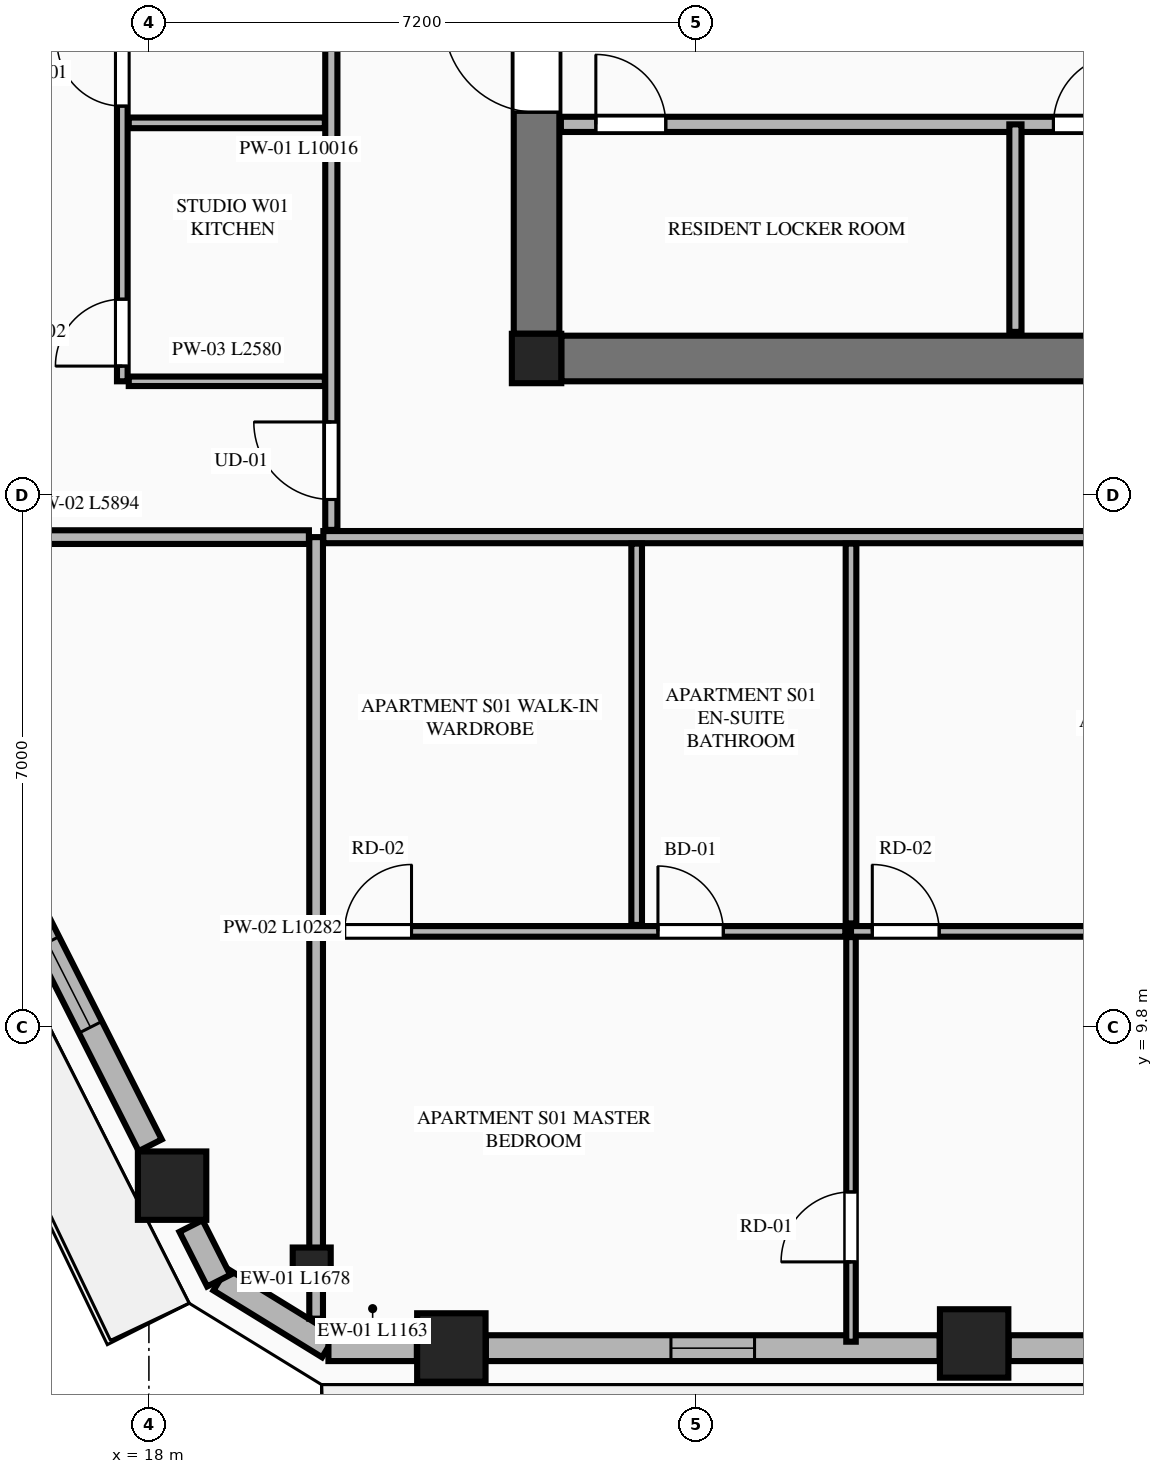
"""IFC4 building model, lengths in metres.
Left out: names, types, materials, properties, quantities, classifications, styles, units other than length and angle.
Written with IfcOpenShell. Run it as: python <this file> out.ifc"""

import sys

from ifc_helpers import new_model, si_unit, direction, frame, frame_2d, origin, origin_2d, place, context, subcontext, project, spatial, rectangle, extrude, element, fill, save


model = new_model("IFC4")
c1 = context("Model", 3, precision=1e-05, world=origin(), true_north=direction((0.0, 1.0)))
c2 = subcontext(c1, "Body", "Model", "MODEL_VIEW")
j1 = project(units=[si_unit("LENGTHUNIT", "METRE"), si_unit("PLANEANGLEUNIT", "RADIAN")], contexts=[c1])
p1 = place(None, origin())
s1 = spatial("IfcSite", under=j1, at=p1, CompositionType="ELEMENT")
p2 = place(p1, origin())
s2 = spatial("IfcBuilding", under=s1, at=p2, CompositionType="ELEMENT")
p3 = place(p2, frame((0.0, 0.0, 196.75)))
s3 = spatial("IfcBuildingStorey", under=s2, at=p3, CompositionType="ELEMENT", Elevation=196.75)
p4 = place(p3, frame((23.1, 18.6, 0.0), z_axis=(0.0, 0.0, 1.0), x_axis=(1.0, 0.0, 0.0)))
e1 = element("IfcColumn", 1, at=p4, inside=s3, PredefinedType="COLUMN", context=c2, shape_type="SweptSolid", body=[
    extrude(rectangle(XDim=0.65, YDim=0.65, at=origin_2d()), origin(), (0.0, 0.0, 1.0), 3.55),
])
p5 = place(p3, frame((23.425, 18.6, 0.0), z_axis=(0.0, 0.0, 1.0), x_axis=(1.0, 0.0, 0.0)))
e2 = element("IfcWall", 2, at=p5, inside=s3, PredefinedType="SHEAR", context=c2, shape_type="SweptSolid", body=[
    extrude(rectangle(XDim=17.95, YDim=0.6, at=frame_2d((8.975, 0.0))), origin(), (0.0, 0.0, 1.0), 3.35),
])
p6 = place(p3, frame((23.1, 18.925, 0.0), z_axis=(0.0, 0.0, 1.0), x_axis=(0.0, 1.0, 0.0)))
e3 = element("IfcWall", 3, at=p6, inside=s3, PredefinedType="SHEAR", context=c2, shape_type="SweptSolid", body=[
    extrude(rectangle(XDim=13.95, YDim=0.6, at=frame_2d((6.975, 0.0))), origin(), (0.0, 0.0, 1.0), 3.35),
])
p7 = place(p6, frame((2.915, 0.0, 0.0)))
e4 = element("IfcOpeningElement", 4, at=p7, cuts=e3, PredefinedType="OPENING", context=c2, shape_type="SweptSolid", body=[
    extrude(rectangle(XDim=1.22, YDim=2.25, at=frame_2d((0.61, 1.125))), frame((0.0, 0.31, 0.0), z_axis=(0.0, -1.0, 0.0), x_axis=(1.0, 0.0, 0.0)), (0.0, 0.0, 1.0), 0.62),
])
for number, where, z_axis, x_axis in (
    (5, (21.979, 5.589, 0.0), (0.0, 0.0, 1.0), (1.0, 0.0, 0.0)),
    (6, (28.857, 5.642, 0.0), (0.0, 0.0, 1.0), (1.0, 0.0, 0.0)),
    (7, (18.305, 7.718, 0.0), (0.0, 0.0, 1.0), (1.0, 0.0, 0.0)),
):
    element("IfcColumn", number, at=place(p3, frame(where, z_axis=z_axis, x_axis=x_axis)), inside=s3, PredefinedType="COLUMN", context=c2, shape_type="SweptSolid", body=[
        extrude(rectangle(XDim=0.9, YDim=0.9, at=origin_2d()), origin(), (0.0, 0.0, 1.0), 3.55),
    ])
p8 = place(p3, frame((20.142, 6.654, 0.0), z_axis=(0.0, 0.0, 1.0), x_axis=(0.865230187018, -0.501374833306, 0.0)))
e8 = element("IfcColumn", 8, at=p8, inside=s3, PredefinedType="PILASTER", context=c2, shape_type="SweptSolid", body=[
    extrude(rectangle(XDim=0.5, YDim=0.35, at=origin_2d()), origin(), (0.0, 0.0, 1.0), 3.55),
])
p9 = place(p3, frame((23.42, 21.68, 0.0), z_axis=(0.0, 0.0, 1.0), x_axis=(1.0, 0.0, 0.0)))
e9 = element("IfcWall", 9, at=p9, inside=s3, PredefinedType="PLUMBINGWALL", context=c2, shape_type="SweptSolid", body=[
    extrude(rectangle(XDim=17.96, YDim=0.2, at=frame_2d((8.98, 0.0))), origin(), (0.0, 0.0, 1.0), 3.35),
])
p10 = place(p9, frame((0.46, 0.0, 0.0)))
e10 = element("IfcOpeningElement", 10, at=p10, cuts=e9, PredefinedType="OPENING", context=c2, shape_type="SweptSolid", body=[
    extrude(rectangle(XDim=0.92, YDim=2.15, at=frame_2d((0.46, 1.075))), frame((0.0, 0.11, 0.0), z_axis=(0.0, -1.0, 0.0), x_axis=(1.0, 0.0, 0.0)), (0.0, 0.0, 1.0), 0.22),
])
p11 = place(p9, frame((6.48, 0.0, 0.0)))
e11 = element("IfcOpeningElement", 11, at=p11, cuts=e9, PredefinedType="OPENING", context=c2, shape_type="SweptSolid", body=[
    extrude(rectangle(XDim=0.92, YDim=2.15, at=frame_2d((0.46, 1.075))), frame((0.0, 0.11, 0.0), z_axis=(0.0, -1.0, 0.0), x_axis=(1.0, 0.0, 0.0)), (0.0, 0.0, 1.0), 0.22),
])
p12 = place(p9, frame((12.48, 0.0, 0.0)))
e12 = element("IfcOpeningElement", 12, at=p12, cuts=e9, PredefinedType="OPENING", context=c2, shape_type="SweptSolid", body=[
    extrude(rectangle(XDim=0.92, YDim=2.15, at=frame_2d((0.46, 1.075))), frame((0.0, 0.11, 0.0), z_axis=(0.0, -1.0, 0.0), x_axis=(1.0, 0.0, 0.0)), (0.0, 0.0, 1.0), 0.22),
])
p13 = place(p3, frame((29.4, 18.95, 0.0), z_axis=(0.0, 0.0, 1.0), x_axis=(0.0, 1.0, 0.0)))
e13 = element("IfcWall", 13, at=p13, inside=s3, PredefinedType="PARTITIONING", context=c2, shape_type="SweptSolid", body=[
    extrude(rectangle(XDim=2.73, YDim=0.16, at=frame_2d((1.365, 0.0))), origin(), (0.0, 0.0, 1.0), 3.35),
])
p14 = place(p3, frame((18.938, 6.484, 0.0), z_axis=(0.0, 0.0, 1.0), x_axis=(0.851778214877, -0.523902541185, 0.0)))
e14 = element("IfcWall", 14, at=p14, inside=s3, PredefinedType="STANDARD", context=c2, shape_type="SweptSolid", body=[
    extrude(rectangle(XDim=1.678, YDim=0.34, at=frame_2d((0.839, 0.0))), origin(), (0.0, 0.0, 1.0), 3.35),
])
p15 = place(p3, frame((20.362, 5.58, 0.0), z_axis=(0.0, 0.0, 1.0), x_axis=(1.0, 0.0, 0.0)))
e15 = element("IfcWall", 15, at=p15, inside=s3, PredefinedType="STANDARD", context=c2, shape_type="SweptSolid", body=[
    extrude(rectangle(XDim=1.163, YDim=0.34, at=frame_2d((0.582, 0.0))), origin(), (0.0, 0.0, 1.0), 3.35),
])
p16 = place(p3, frame((22.433, 5.58, 0.0), z_axis=(0.0, 0.0, 1.0), x_axis=(1.0, 0.0, 0.0)))
e16 = element("IfcWall", 16, at=p16, inside=s3, PredefinedType="STANDARD", context=c2, shape_type="SweptSolid", body=[
    extrude(rectangle(XDim=5.97, YDim=0.34, at=frame_2d((2.985, 0.0))), origin(), (0.0, 0.0, 1.0), 2.883),
])
p17 = place(p16, frame((2.435, 0.0, 0.75)))
e17 = element("IfcOpeningElement", 17, at=p17, cuts=e16, PredefinedType="OPENING", context=c2, shape_type="SweptSolid", body=[
    extrude(rectangle(XDim=1.1, YDim=1.983, at=frame_2d((0.55, 0.991))), frame((0.0, 0.18, 0.0), z_axis=(0.0, -1.0, 0.0), x_axis=(1.0, 0.0, 0.0)), (0.0, 0.0, 1.0), 0.36),
])
p18 = place(p3, frame((29.311, 5.58, 0.0), z_axis=(0.0, 0.0, 1.0), x_axis=(1.0, 0.0, 0.0)))
e18 = element("IfcWall", 18, at=p18, inside=s3, PredefinedType="STANDARD", context=c2, shape_type="SweptSolid", body=[
    extrude(rectangle(XDim=6.178, YDim=0.34, at=frame_2d((3.089, 0.0))), origin(), (0.0, 0.0, 1.0), 2.883),
])
p19 = place(p18, frame((2.539, 0.0, 0.0)))
e19 = element("IfcOpeningElement", 19, at=p19, cuts=e18, PredefinedType="OPENING", context=c2, shape_type="SweptSolid", body=[
    extrude(rectangle(XDim=1.1, YDim=2.25, at=frame_2d((0.55, 1.125))), frame((0.0, 0.18, 0.0), z_axis=(0.0, -1.0, 0.0), x_axis=(1.0, 0.0, 0.0)), (0.0, 0.0, 1.0), 0.36),
])
p20 = place(p3, frame((15.881, 12.47, 0.0), z_axis=(0.0, 0.0, 1.0), x_axis=(0.451522864045, -0.892259549259, 0.0)))
e20 = element("IfcWall", 20, at=p20, inside=s3, PredefinedType="STANDARD", context=c2, shape_type="SweptSolid", body=[
    extrude(rectangle(XDim=4.731, YDim=0.34, at=frame_2d((2.365, 0.0))), origin(), (0.0, 0.0, 1.0), 2.883),
])
p21 = place(p20, frame((1.74, 0.0, 0.75)))
e21 = element("IfcOpeningElement", 21, at=p21, cuts=e20, PredefinedType="OPENING", context=c2, shape_type="SweptSolid", body=[
    extrude(rectangle(XDim=1.25, YDim=1.95, at=frame_2d((0.625, 0.975))), frame((0.0, 0.18, 0.0), z_axis=(0.0, -1.0, 0.0), x_axis=(1.0, 0.0, 0.0)), (0.0, 0.0, 1.0), 0.36),
])
p22 = place(p3, frame((18.554, 7.187, 0.0), z_axis=(0.0, 0.0, 1.0), x_axis=(0.451691568309, -0.892174157392, 0.0)))
e22 = element("IfcWall", 22, at=p22, inside=s3, PredefinedType="STANDARD", context=c2, shape_type="SweptSolid", body=[
    extrude(rectangle(XDim=0.806, YDim=0.34, at=frame_2d((0.403, 0.0))), origin(), (0.0, 0.0, 1.0), 3.35),
])
p23 = place(p3, frame((20.2, 5.968, 0.0), z_axis=(0.0, 0.0, 1.0), x_axis=(0.0, 1.0, 0.0)))
e23 = element("IfcWall", 23, at=p23, inside=s3, PredefinedType="PARTITIONING", context=c2, shape_type="SweptSolid", body=[
    extrude(rectangle(XDim=10.282, YDim=0.18, at=frame_2d((5.141, 0.0))), origin(), (0.0, 0.0, 1.0), 3.35),
])
p24 = place(p3, frame((20.295, 16.25, 0.0), z_axis=(0.0, 0.0, 1.0), x_axis=(1.0, 0.0, 0.0)))
e24 = element("IfcWall", 24, at=p24, inside=s3, PredefinedType="PARTITIONING", context=c2, shape_type="SweptSolid", body=[
    extrude(rectangle(XDim=24.21, YDim=0.16, at=frame_2d((12.105, 0.0))), origin(), (0.0, 0.0, 1.0), 3.35),
])
p25 = place(p24, frame((22.005, 0.0, 0.0)))
e25 = element("IfcOpeningElement", 25, at=p25, cuts=e24, PredefinedType="OPENING", context=c2, shape_type="SweptSolid", body=[
    extrude(rectangle(XDim=1.02, YDim=2.25, at=frame_2d((0.51, 1.125))), frame((0.0, 0.09, 0.0), z_axis=(0.0, -1.0, 0.0), x_axis=(1.0, 0.0, 0.0)), (0.0, 0.0, 1.0), 0.18),
])
p26 = place(p3, frame((27.237, 11.063, 0.0), z_axis=(0.0, 0.0, 1.0), x_axis=(1.0, 0.0, 0.0)))
e26 = element("IfcWall", 26, at=p26, inside=s3, PredefinedType="PLUMBINGWALL", context=c2, shape_type="SweptSolid", body=[
    extrude(rectangle(XDim=14.813, YDim=0.14, at=frame_2d((7.406, 0.0))), origin(), (0.0, 0.0, 1.0), 3.35),
])
p27 = place(p26, frame((0.28, 0.0, 0.0)))
e27 = element("IfcOpeningElement", 27, at=p27, cuts=e26, PredefinedType="OPENING", context=c2, shape_type="SweptSolid", body=[
    extrude(rectangle(XDim=0.88, YDim=2.15, at=frame_2d((0.44, 1.075))), frame((0.0, 0.08, 0.0), z_axis=(0.0, -1.0, 0.0), x_axis=(1.0, 0.0, 0.0)), (0.0, 0.0, 1.0), 0.16),
])
p28 = place(p26, frame((8.948, 0.0, 0.0)))
e28 = element("IfcOpeningElement", 28, at=p28, cuts=e26, PredefinedType="OPENING", context=c2, shape_type="SweptSolid", body=[
    extrude(rectangle(XDim=0.86, YDim=2.1, at=frame_2d((0.43, 1.05))), frame((0.0, 0.08, 0.0), z_axis=(0.0, -1.0, 0.0), x_axis=(1.0, 0.0, 0.0)), (0.0, 0.0, 1.0), 0.16),
])
p29 = place(p26, frame((11.613, 0.0, 0.0)))
e29 = element("IfcOpeningElement", 29, at=p29, cuts=e26, PredefinedType="OPENING", context=c2, shape_type="SweptSolid", body=[
    extrude(rectangle(XDim=0.88, YDim=2.15, at=frame_2d((0.44, 1.075))), frame((0.0, 0.08, 0.0), z_axis=(0.0, -1.0, 0.0), x_axis=(1.0, 0.0, 0.0)), (0.0, 0.0, 1.0), 0.16),
])
p30 = place(p3, frame((20.295, 11.063, 0.0), z_axis=(0.0, 0.0, 1.0), x_axis=(1.0, 0.0, 0.0)))
e30 = element("IfcWall", 30, at=p30, inside=s3, PredefinedType="PLUMBINGWALL", context=c2, shape_type="SweptSolid", body=[
    extrude(rectangle(XDim=6.867, YDim=0.14, at=frame_2d((3.434, 0.0))), origin(), (0.0, 0.0, 1.0), 3.35),
])
p31 = place(p30, frame((0.28, 0.0, 0.0)))
e31 = element("IfcOpeningElement", 31, at=p31, cuts=e30, PredefinedType="OPENING", context=c2, shape_type="SweptSolid", body=[
    extrude(rectangle(XDim=0.88, YDim=2.15, at=frame_2d((0.44, 1.075))), frame((0.0, 0.08, 0.0), z_axis=(0.0, -1.0, 0.0), x_axis=(1.0, 0.0, 0.0)), (0.0, 0.0, 1.0), 0.16),
])
p32 = place(p30, frame((4.402, 0.0, 0.0)))
e32 = element("IfcOpeningElement", 32, at=p32, cuts=e30, PredefinedType="OPENING", context=c2, shape_type="SweptSolid", body=[
    extrude(rectangle(XDim=0.86, YDim=2.1, at=frame_2d((0.43, 1.05))), frame((0.0, 0.08, 0.0), z_axis=(0.0, -1.0, 0.0), x_axis=(1.0, 0.0, 0.0)), (0.0, 0.0, 1.0), 0.16),
])
p33 = place(p3, frame((27.237, 11.168, 0.0), z_axis=(0.0, 0.0, 1.0), x_axis=(0.0, 1.0, 0.0)))
e33 = element("IfcWall", 33, at=p33, inside=s3, PredefinedType="PLUMBINGWALL", context=c2, shape_type="SweptSolid", body=[
    extrude(rectangle(XDim=4.997, YDim=0.14, at=frame_2d((2.499, 0.0))), origin(), (0.0, 0.0, 1.0), 3.35),
])
p34 = place(p3, frame((27.237, 5.665, 0.0), z_axis=(0.0, 0.0, 1.0), x_axis=(0.0, 1.0, 0.0)))
e34 = element("IfcWall", 34, at=p34, inside=s3, PredefinedType="PARTITIONING", context=c2, shape_type="SweptSolid", body=[
    extrude(rectangle(XDim=5.323, YDim=0.125, at=frame_2d((2.662, 0.0))), origin(), (0.0, 0.0, 1.0), 3.35),
])
p35 = place(p34, frame((1.05, 0.0, 0.0)))
e35 = element("IfcOpeningElement", 35, at=p35, cuts=e34, PredefinedType="OPENING", context=c2, shape_type="SweptSolid", body=[
    extrude(rectangle(XDim=0.92, YDim=2.15, at=frame_2d((0.46, 1.075))), frame((0.0, 0.073, 0.0), z_axis=(0.0, -1.0, 0.0), x_axis=(1.0, 0.0, 0.0)), (0.0, 0.0, 1.0), 0.145),
])
p36 = place(p3, frame((24.417, 11.148, 0.0), z_axis=(0.0, 0.0, 1.0), x_axis=(0.0, 1.0, 0.0)))
e36 = element("IfcWall", 36, at=p36, inside=s3, PredefinedType="PLUMBINGWALL", context=c2, shape_type="SweptSolid", body=[
    extrude(rectangle(XDim=5.017, YDim=0.14, at=frame_2d((2.509, 0.0))), origin(), (0.0, 0.0, 1.0), 3.35),
])
p37 = place(p3, frame((14.211, 16.25, 0.0), z_axis=(0.0, 0.0, 1.0), x_axis=(1.0, 0.0, 0.0)))
e37 = element("IfcWall", 37, at=p37, inside=s3, PredefinedType="PARTITIONING", context=c2, shape_type="SweptSolid", body=[
    extrude(rectangle(XDim=5.894, YDim=0.18, at=frame_2d((2.947, 0.0))), origin(), (0.0, 0.0, 1.0), 3.35),
])
p38 = place(p3, frame((20.4, 16.345, 0.0), z_axis=(0.0, 0.0, 1.0), x_axis=(0.0, 1.0, 0.0)))
e38 = element("IfcWall", 38, at=p38, inside=s3, PredefinedType="PARTITIONING", context=c2, shape_type="SweptSolid", body=[
    extrude(rectangle(XDim=10.016, YDim=0.16, at=frame_2d((5.008, 0.0))), origin(), (0.0, 0.0, 1.0), 3.35),
])
p39 = place(p38, frame((0.4, 0.0, 0.0)))
e39 = element("IfcOpeningElement", 39, at=p39, cuts=e38, PredefinedType="OPENING", context=c2, shape_type="SweptSolid", body=[
    extrude(rectangle(XDim=1.02, YDim=2.25, at=frame_2d((0.51, 1.125))), frame((0.0, 0.09, 0.0), z_axis=(0.0, -1.0, 0.0), x_axis=(1.0, 0.0, 0.0)), (0.0, 0.0, 1.0), 0.18),
])
p40 = place(p3, frame((17.735, 18.3, 0.0), z_axis=(0.0, 0.0, 1.0), x_axis=(1.0, 0.0, 0.0)))
e40 = element("IfcWall", 40, at=p40, inside=s3, PredefinedType="PARTITIONING", context=c2, shape_type="SweptSolid", body=[
    extrude(rectangle(XDim=2.58, YDim=0.125, at=frame_2d((1.29, 0.0))), origin(), (0.0, 0.0, 1.0), 2.807),
])
p41 = place(p3, frame((17.65, 18.3, 0.0), z_axis=(0.0, 0.0, 1.0), x_axis=(0.0, 1.0, 0.0)))
e41 = element("IfcWall", 41, at=p41, inside=s3, PredefinedType="PLUMBINGWALL", context=c2, shape_type="SweptSolid", body=[
    extrude(rectangle(XDim=8.061, YDim=0.14, at=frame_2d((4.031, 0.0))), origin(), (0.0, 0.0, 1.0), 3.35),
])
p42 = place(p41, frame((3.62, 0.0, 0.0)))
e42 = element("IfcOpeningElement", 42, at=p42, cuts=e41, PredefinedType="OPENING", context=c2, shape_type="SweptSolid", body=[
    extrude(rectangle(XDim=0.86, YDim=2.1, at=frame_2d((0.43, 1.05))), frame((0.0, 0.08, 0.0), z_axis=(0.0, -1.0, 0.0), x_axis=(1.0, 0.0, 0.0)), (0.0, 0.0, 1.0), 0.16),
])
p43 = place(p41, frame((0.2, 0.0, 0.0)))
e43 = element("IfcOpeningElement", 43, at=p43, cuts=e41, PredefinedType="OPENING", context=c2, shape_type="SweptSolid", body=[
    extrude(rectangle(XDim=0.88, YDim=2.15, at=frame_2d((0.44, 1.075))), frame((0.0, 0.08, 0.0), z_axis=(0.0, -1.0, 0.0), x_axis=(1.0, 0.0, 0.0)), (0.0, 0.0, 1.0), 0.16),
])
p44 = place(p3, frame((17.735, 21.7, 0.0), z_axis=(0.0, 0.0, 1.0), x_axis=(1.0, 0.0, 0.0)))
e44 = element("IfcWall", 44, at=p44, inside=s3, PredefinedType="PLUMBINGWALL", context=c2, shape_type="SweptSolid", body=[
    extrude(rectangle(XDim=2.58, YDim=0.14, at=frame_2d((1.29, 0.0))), origin(), (0.0, 0.0, 1.0), 3.35),
])
p45 = place(p7, origin())
e45 = element("IfcDoor", 45, at=p45, inside=s3, OperationType="SINGLE_SWING_RIGHT", PredefinedType="DOOR", context=c2, shape_type="SweptSolid", body=[
    extrude(rectangle(XDim=1.22, YDim=2.25, at=frame_2d((0.61, 1.125))), frame((0.0, 0.025, 0.0), z_axis=(0.0, -1.0, 0.0), x_axis=(1.0, 0.0, 0.0)), (0.0, 0.0, 1.0), 0.05),
])
fill(e4, e45)
p46 = place(p10, origin())
e46 = element("IfcDoor", 46, at=p46, inside=s3, OperationType="SINGLE_SWING_LEFT", PredefinedType="DOOR", context=c2, shape_type="SweptSolid", body=[
    extrude(rectangle(XDim=0.92, YDim=2.15, at=frame_2d((0.46, 1.075))), frame((0.0, 0.025, 0.0), z_axis=(0.0, -1.0, 0.0), x_axis=(1.0, 0.0, 0.0)), (0.0, 0.0, 1.0), 0.05),
])
fill(e10, e46)
p47 = place(p11, origin())
e47 = element("IfcDoor", 47, at=p47, inside=s3, OperationType="SINGLE_SWING_RIGHT", PredefinedType="DOOR", context=c2, shape_type="SweptSolid", body=[
    extrude(rectangle(XDim=0.92, YDim=2.15, at=frame_2d((0.46, 1.075))), frame((0.0, 0.025, 0.0), z_axis=(0.0, -1.0, 0.0), x_axis=(1.0, 0.0, 0.0)), (0.0, 0.0, 1.0), 0.05),
])
fill(e11, e47)
p48 = place(p17, origin())
e48 = element("IfcWindow", 48, at=p48, inside=s3, PartitioningType="SINGLE_PANEL", PredefinedType="WINDOW", context=c2, shape_type="SweptSolid", body=[
    extrude(rectangle(XDim=1.1, YDim=1.983, at=frame_2d((0.55, 0.991))), frame((0.0, 0.03, 0.0), z_axis=(0.0, -1.0, 0.0), x_axis=(1.0, 0.0, 0.0)), (0.0, 0.0, 1.0), 0.06),
])
fill(e17, e48)
p49 = place(p21, origin())
e49 = element("IfcWindow", 49, at=p49, inside=s3, PartitioningType="SINGLE_PANEL", PredefinedType="WINDOW", context=c2, shape_type="SweptSolid", body=[
    extrude(rectangle(XDim=1.25, YDim=1.95, at=frame_2d((0.625, 0.975))), frame((0.0, 0.03, 0.0), z_axis=(0.0, -1.0, 0.0), x_axis=(1.0, 0.0, 0.0)), (0.0, 0.0, 1.0), 0.06),
])
fill(e21, e49)
p50 = place(p27, origin())
e50 = element("IfcDoor", 50, at=p50, inside=s3, OperationType="SINGLE_SWING_LEFT", PredefinedType="DOOR", context=c2, shape_type="SweptSolid", body=[
    extrude(rectangle(XDim=0.88, YDim=2.15, at=frame_2d((0.44, 1.075))), frame((0.0, 0.025, 0.0), z_axis=(0.0, -1.0, 0.0), x_axis=(1.0, 0.0, 0.0)), (0.0, 0.0, 1.0), 0.05),
])
fill(e27, e50)
p51 = place(p31, origin())
e51 = element("IfcDoor", 51, at=p51, inside=s3, OperationType="SINGLE_SWING_RIGHT", PredefinedType="DOOR", context=c2, shape_type="SweptSolid", body=[
    extrude(rectangle(XDim=0.88, YDim=2.15, at=frame_2d((0.44, 1.075))), frame((0.0, 0.025, 0.0), z_axis=(0.0, -1.0, 0.0), x_axis=(1.0, 0.0, 0.0)), (0.0, 0.0, 1.0), 0.05),
])
fill(e31, e51)
p52 = place(p32, origin())
e52 = element("IfcDoor", 52, at=p52, inside=s3, OperationType="SINGLE_SWING_LEFT", PredefinedType="DOOR", context=c2, shape_type="SweptSolid", body=[
    extrude(rectangle(XDim=0.86, YDim=2.1, at=frame_2d((0.43, 1.05))), frame((0.0, 0.025, 0.0), z_axis=(0.0, -1.0, 0.0), x_axis=(1.0, 0.0, 0.0)), (0.0, 0.0, 1.0), 0.05),
])
fill(e32, e52)
p53 = place(p35, origin())
e53 = element("IfcDoor", 53, at=p53, inside=s3, OperationType="SINGLE_SWING_LEFT", PredefinedType="DOOR", context=c2, shape_type="SweptSolid", body=[
    extrude(rectangle(XDim=0.92, YDim=2.15, at=frame_2d((0.46, 1.075))), frame((0.0, 0.025, 0.0), z_axis=(0.0, -1.0, 0.0), x_axis=(1.0, 0.0, 0.0)), (0.0, 0.0, 1.0), 0.05),
])
fill(e35, e53)
p54 = place(p42, origin())
e54 = element("IfcDoor", 54, at=p54, inside=s3, OperationType="SINGLE_SWING_RIGHT", PredefinedType="DOOR", context=c2, shape_type="SweptSolid", body=[
    extrude(rectangle(XDim=0.86, YDim=2.1, at=frame_2d((0.43, 1.05))), frame((0.0, 0.025, 0.0), z_axis=(0.0, -1.0, 0.0), x_axis=(1.0, 0.0, 0.0)), (0.0, 0.0, 1.0), 0.05),
])
fill(e42, e54)
p55 = place(p39, origin())
e55 = element("IfcDoor", 55, at=p55, inside=s3, OperationType="SINGLE_SWING_RIGHT", PredefinedType="DOOR", context=c2, shape_type="SweptSolid", body=[
    extrude(rectangle(XDim=1.02, YDim=2.25, at=frame_2d((0.51, 1.125))), frame((0.0, 0.025, 0.0), z_axis=(0.0, -1.0, 0.0), x_axis=(1.0, 0.0, 0.0)), (0.0, 0.0, 1.0), 0.05),
])
fill(e39, e55)
p56 = place(p43, origin())
e56 = element("IfcDoor", 56, at=p56, inside=s3, OperationType="SINGLE_SWING_LEFT", PredefinedType="DOOR", context=c2, shape_type="SweptSolid", body=[
    extrude(rectangle(XDim=0.88, YDim=2.15, at=frame_2d((0.44, 1.075))), frame((0.0, 0.025, 0.0), z_axis=(0.0, -1.0, 0.0), x_axis=(1.0, 0.0, 0.0)), (0.0, 0.0, 1.0), 0.05),
])
fill(e43, e56)
save(model, sys.argv[1])
